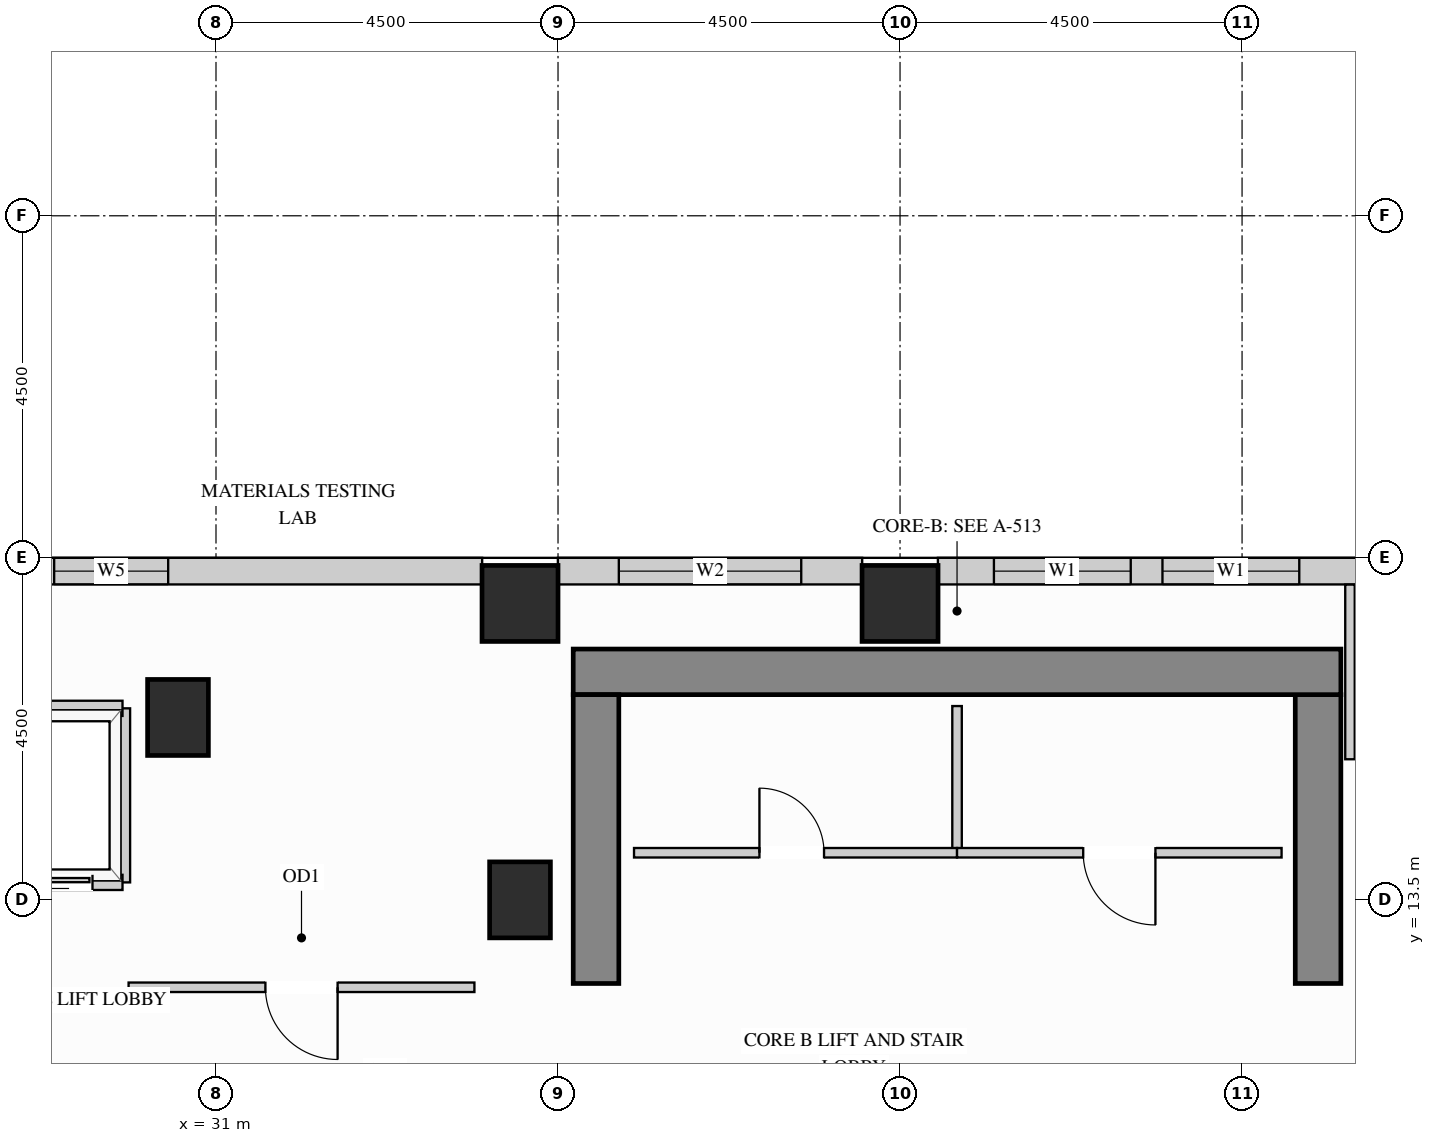
"""IFC4 building model, lengths in metres.
Left out: names, types, materials, properties, quantities, classifications, styles, units other than length and angle.
Written with IfcOpenShell. Run it as: python <this file> out.ifc"""

import sys

from ifc_helpers import new_model, si_unit, direction, frame, frame_2d, origin, origin_2d, place, context, subcontext, project, spatial, rectangle, extrude, source, transform, mapped, element, fill, save


model = new_model("IFC4")
c1 = context("Model", 3, precision=1e-05, world=origin(), true_north=direction((0.0, 1.0)))
c2 = subcontext(c1, "Body", "Model", "MODEL_VIEW")
j1 = project(units=[si_unit("LENGTHUNIT", "METRE"), si_unit("PLANEANGLEUNIT", "RADIAN")], contexts=[c1])
p1 = place(None, origin())
s1 = spatial("IfcSite", under=j1, at=p1, CompositionType="ELEMENT")
p2 = place(p1, origin())
s2 = spatial("IfcBuilding", under=s1, at=p2, CompositionType="ELEMENT")
p3 = place(p2, frame((0.0, 0.0, 161.1)))
s3 = spatial("IfcBuildingStorey", under=s2, at=p3, CompositionType="ELEMENT", Elevation=161.1)
m1 = source(origin(), c2, "Body", "SweptSolid", [
    extrude(rectangle(XDim=0.8, YDim=1.0, at=origin_2d()), origin(), (0.0, 0.0, 1.0), 3.4),
])
for number, where, z_axis, x_axis in (
    (1, (35.0, 13.5, 0.0), (0.0, 0.0, 1.0), (1.0, 0.0, 0.0)),
    (2, (30.5, 15.9, 0.0), (0.0, 0.0, 1.0), (1.0, 0.0, 0.0)),
):
    element("IfcColumn", number, at=place(p3, frame(where, z_axis=z_axis, x_axis=x_axis)), inside=s3, PredefinedType="COLUMN", context=c2, shape_type="MappedRepresentation", body=[
        mapped(m1, transform((0.0, 0.0, 0.0), x_axis=(1.0, 0.0, 0.0), y_axis=(0.0, 1.0, 0.0), z_axis=(0.0, 0.0, 1.0))),
    ])
m2 = source(origin(), c2, "Body", "SweptSolid", [
    extrude(rectangle(XDim=1.0, YDim=1.0, at=origin_2d()), origin(), (0.0, 0.0, 1.0), 3.4),
])
for number, where, z_axis, x_axis in (
    (3, (35.0, 17.4, 0.0), (0.0, 0.0, 1.0), (1.0, 0.0, 0.0)),
    (4, (40.0, 17.4, 0.0), (0.0, 0.0, 1.0), (1.0, 0.0, 0.0)),
):
    element("IfcColumn", number, at=place(p3, frame(where, z_axis=z_axis, x_axis=x_axis)), inside=s3, PredefinedType="COLUMN", context=c2, shape_type="MappedRepresentation", body=[
        mapped(m2, transform((0.0, 0.0, 0.0), x_axis=(1.0, 0.0, 0.0), y_axis=(0.0, 1.0, 0.0), z_axis=(0.0, 0.0, 1.0))),
    ])
m3 = source(origin(), c2, "Body", "SweptSolid", [
    extrude(rectangle(XDim=3.8, YDim=0.6, at=frame_2d((1.9, 0.0))), origin(), (0.0, 0.0, 1.0), 3.4),
])
p4 = place(p3, frame((45.5, 12.4, 0.0), z_axis=(0.0, 0.0, 1.0), x_axis=(0.0, 1.0, 0.0)))
e5 = element("IfcWall", 5, at=p4, inside=s3, PredefinedType="SHEAR", context=c2, shape_type="MappedRepresentation", body=[
    mapped(m3, transform((0.0, 0.0, 0.0), x_axis=(1.0, 0.0, 0.0), y_axis=(0.0, 1.0, 0.0), z_axis=(0.0, 0.0, 1.0))),
])
m4 = source(origin(), c2, "Body", "SweptSolid", [
    extrude(rectangle(XDim=10.1, YDim=0.6, at=frame_2d((5.05, 0.0))), origin(), (0.0, 0.0, 1.0), 3.4),
])
p5 = place(p3, frame((35.7, 16.5, 0.0), z_axis=(0.0, 0.0, 1.0), x_axis=(1.0, 0.0, 0.0)))
e6 = element("IfcWall", 6, at=p5, inside=s3, PredefinedType="SHEAR", context=c2, shape_type="MappedRepresentation", body=[
    mapped(m4, transform((0.0, 0.0, 0.0), x_axis=(1.0, 0.0, 0.0), y_axis=(0.0, 1.0, 0.0), z_axis=(0.0, 0.0, 1.0))),
])
p6 = place(p3, frame((36.0, 12.4, 0.0), z_axis=(0.0, 0.0, 1.0), x_axis=(0.0, 1.0, 0.0)))
e7 = element("IfcWall", 7, at=p6, inside=s3, PredefinedType="SHEAR", context=c2, shape_type="MappedRepresentation", body=[
    mapped(m3, transform((0.0, 0.0, 0.0), x_axis=(1.0, 0.0, 0.0), y_axis=(0.0, 1.0, 0.0), z_axis=(0.0, 0.0, 1.0))),
])
p7 = place(p3, frame((47.102, 17.825, 0.0), z_axis=(0.0, 0.0, 1.0), x_axis=(-1.0, 0.0, 0.0)))
e8 = element("IfcWall", 8, at=p7, inside=s3, PredefinedType="SOLIDWALL", context=c2, shape_type="SweptSolid", body=[
    extrude(rectangle(XDim=6.604, YDim=0.35, at=frame_2d((3.302, 0.0))), origin(), (0.0, 0.0, 1.0), 2.612),
])
p8 = place(p7, frame((1.849, 0.0, 0.78)))
e9 = element("IfcOpeningElement", 9, at=p8, cuts=e8, PredefinedType="OPENING", context=c2, shape_type="SweptSolid", body=[
    extrude(rectangle(XDim=1.8, YDim=1.652, at=frame_2d((0.9, 0.826))), frame((0.0, 0.185, 0.0), z_axis=(0.0, -1.0, 0.0), x_axis=(1.0, 0.0, 0.0)), (0.0, 0.0, 1.0), 0.37),
])
p9 = place(p7, frame((4.067, 0.0, 0.78)))
e10 = element("IfcOpeningElement", 10, at=p9, cuts=e8, PredefinedType="OPENING", context=c2, shape_type="SweptSolid", body=[
    extrude(rectangle(XDim=1.8, YDim=1.652, at=frame_2d((0.9, 0.826))), frame((0.0, 0.185, 0.0), z_axis=(0.0, -1.0, 0.0), x_axis=(1.0, 0.0, 0.0)), (0.0, 0.0, 1.0), 0.37),
])
p10 = place(p3, frame((39.502, 17.825, 0.0), z_axis=(0.0, 0.0, 1.0), x_axis=(-1.0, 0.0, 0.0)))
e11 = element("IfcWall", 11, at=p10, inside=s3, PredefinedType="SOLIDWALL", context=c2, shape_type="SweptSolid", body=[
    extrude(rectangle(XDim=4.004, YDim=0.35, at=frame_2d((2.002, 0.0))), origin(), (0.0, 0.0, 1.0), 2.612),
])
p11 = place(p10, frame((0.802, 0.0, 0.78)))
e12 = element("IfcOpeningElement", 12, at=p11, cuts=e11, PredefinedType="OPENING", context=c2, shape_type="SweptSolid", body=[
    extrude(rectangle(XDim=2.4, YDim=1.652, at=frame_2d((1.2, 0.826))), frame((0.0, 0.185, 0.0), z_axis=(0.0, -1.0, 0.0), x_axis=(1.0, 0.0, 0.0)), (0.0, 0.0, 1.0), 0.37),
])
p12 = place(p3, frame((34.502, 17.825, 0.0), z_axis=(0.0, 0.0, 1.0), x_axis=(-1.0, 0.0, 0.0)))
e13 = element("IfcWall", 13, at=p12, inside=s3, PredefinedType="SOLIDWALL", context=c2, shape_type="SweptSolid", body=[
    extrude(rectangle(XDim=15.104, YDim=0.35, at=frame_2d((7.552, 0.0))), origin(), (0.0, 0.0, 1.0), 3.385),
])
p13 = place(p12, frame((4.131, 0.0, 0.78)))
e14 = element("IfcOpeningElement", 14, at=p13, cuts=e13, PredefinedType="OPENING", context=c2, shape_type="SweptSolid", body=[
    extrude(rectangle(XDim=1.5, YDim=2.0, at=frame_2d((0.75, 1.0))), frame((0.0, 0.185, 0.0), z_axis=(0.0, -1.0, 0.0), x_axis=(1.0, 0.0, 0.0)), (0.0, 0.0, 1.0), 0.37),
])
p14 = place(p12, frame((9.442, 0.0, 0.78)))
e15 = element("IfcOpeningElement", 15, at=p14, cuts=e13, PredefinedType="OPENING", context=c2, shape_type="SweptSolid", body=[
    extrude(rectangle(XDim=1.5, YDim=2.0, at=frame_2d((0.75, 1.0))), frame((0.0, 0.185, 0.0), z_axis=(0.0, -1.0, 0.0), x_axis=(1.0, 0.0, 0.0)), (0.0, 0.0, 1.0), 0.37),
])
m5 = source(origin(), c2, "Body", "SweptSolid", [
    extrude(rectangle(XDim=1.93, YDim=0.125, at=frame_2d((0.965, 0.0))), origin(), (0.0, 0.0, 1.0), 3.385),
])
p15 = place(p3, frame((40.75, 14.12, 0.0), z_axis=(0.0, 0.0, 1.0), x_axis=(0.0, 1.0, 0.0)))
e16 = element("IfcWall", 16, at=p15, inside=s3, PredefinedType="PARTITIONING", context=c2, shape_type="MappedRepresentation", body=[
    mapped(m5, transform((0.0, 0.0, 0.0), x_axis=(1.0, 0.0, 0.0), y_axis=(0.0, 1.0, 0.0), z_axis=(0.0, 0.0, 1.0))),
])
p16 = place(p3, frame((36.5, 14.12, 0.0), z_axis=(0.0, 0.0, 1.0), x_axis=(1.0, 0.0, 0.0)))
e17 = element("IfcWall", 17, at=p16, inside=s3, PredefinedType="PARTITIONING", context=c2, shape_type="SweptSolid", body=[
    extrude(rectangle(XDim=4.25, YDim=0.125, at=frame_2d((2.125, 0.0))), origin(), (0.0, 0.0, 1.0), 3.385),
])
p17 = place(p16, frame((1.65, 0.0, 0.0)))
e18 = element("IfcOpeningElement", 18, at=p17, cuts=e17, PredefinedType="OPENING", context=c2, shape_type="SweptSolid", body=[
    extrude(rectangle(XDim=0.85, YDim=2.1, at=frame_2d((0.425, 1.05))), frame((0.0, 0.073, 0.0), z_axis=(0.0, -1.0, 0.0), x_axis=(1.0, 0.0, 0.0)), (0.0, 0.0, 1.0), 0.145),
])
p18 = place(p3, frame((40.75, 14.12, 0.0), z_axis=(0.0, 0.0, 1.0), x_axis=(1.0, 0.0, 0.0)))
e19 = element("IfcWall", 19, at=p18, inside=s3, PredefinedType="PARTITIONING", context=c2, shape_type="SweptSolid", body=[
    extrude(rectangle(XDim=4.27, YDim=0.125, at=frame_2d((2.135, 0.0))), origin(), (0.0, 0.0, 1.0), 3.385),
])
p19 = place(p18, frame((1.66, 0.0, 0.0)))
e20 = element("IfcOpeningElement", 20, at=p19, cuts=e19, PredefinedType="OPENING", context=c2, shape_type="SweptSolid", body=[
    extrude(rectangle(XDim=0.95, YDim=2.15, at=frame_2d((0.475, 1.075))), frame((0.0, 0.073, 0.0), z_axis=(0.0, -1.0, 0.0), x_axis=(1.0, 0.0, 0.0)), (0.0, 0.0, 1.0), 0.145),
])
m6 = source(origin(), c2, "Body", "SweptSolid", [
    extrude(rectangle(XDim=2.298, YDim=0.125, at=frame_2d((1.149, 0.0))), origin(), (0.0, 0.0, 1.0), 3.385),
])
p20 = place(p3, frame((45.92, 15.35, 0.0), z_axis=(0.0, 0.0, 1.0), x_axis=(0.0, 1.0, 0.0)))
e21 = element("IfcWall", 21, at=p20, inside=s3, PredefinedType="PARTITIONING", context=c2, shape_type="MappedRepresentation", body=[
    mapped(m6, transform((0.0, 0.0, 0.0), x_axis=(1.0, 0.0, 0.0), y_axis=(0.0, 1.0, 0.0), z_axis=(0.0, 0.0, 1.0))),
])
p21 = place(p3, frame((29.85, 12.35, 0.0), z_axis=(0.0, 0.0, 1.0), x_axis=(1.0, 0.0, 0.0)))
e22 = element("IfcWall", 22, at=p21, inside=s3, PredefinedType="PARTITIONING", context=c2, shape_type="SweptSolid", body=[
    extrude(rectangle(XDim=4.55, YDim=0.125, at=frame_2d((2.275, 0.0))), origin(), (0.0, 0.0, 1.0), 3.385),
])
p22 = place(p21, frame((1.8, 0.0, 0.0)))
e23 = element("IfcOpeningElement", 23, at=p22, cuts=e22, PredefinedType="OPENING", context=c2, shape_type="SweptSolid", body=[
    extrude(rectangle(XDim=0.95, YDim=2.15, at=frame_2d((0.475, 1.075))), frame((0.0, 0.073, 0.0), z_axis=(0.0, -1.0, 0.0), x_axis=(1.0, 0.0, 0.0)), (0.0, 0.0, 1.0), 0.145),
])
m7 = source(origin(), c2, "Body", "SweptSolid", [
    extrude(rectangle(XDim=2.29, YDim=0.2, at=frame_2d((1.145, 0.0))), origin(), (0.0, 0.0, 1.0), 3.385),
])
p23 = place(p3, frame((29.77, 13.73, 0.0), z_axis=(0.0, 0.0, 1.0), x_axis=(0.0, 1.0, 0.0)))
e24 = element("IfcWall", 24, at=p23, inside=s3, PredefinedType="PARTITIONING", context=c2, shape_type="MappedRepresentation", body=[
    mapped(m7, transform((0.0, 0.0, 0.0), x_axis=(1.0, 0.0, 0.0), y_axis=(0.0, 1.0, 0.0), z_axis=(0.0, 0.0, 1.0))),
])
m8 = source(origin(), c2, "Body", "SweptSolid", [
    extrude(rectangle(XDim=1.89, YDim=0.2, at=frame_2d((0.945, 0.0))), origin(), (0.0, 0.0, 1.0), 2.773),
])
p24 = place(p3, frame((27.88, 16.02, 0.0), z_axis=(0.0, 0.0, 1.0), x_axis=(1.0, 0.0, 0.0)))
e25 = element("IfcWall", 25, at=p24, inside=s3, PredefinedType="PARTITIONING", context=c2, shape_type="MappedRepresentation", body=[
    mapped(m8, transform((0.0, 0.0, 0.0), x_axis=(1.0, 0.0, 0.0), y_axis=(0.0, 1.0, 0.0), z_axis=(0.0, 0.0, 1.0))),
])
p25 = place(p3, frame((27.88, 13.73, 0.0), z_axis=(0.0, 0.0, 1.0), x_axis=(1.0, 0.0, 0.0)))
e26 = element("IfcWall", 26, at=p25, inside=s3, PredefinedType="PARTITIONING", context=c2, shape_type="SweptSolid", body=[
    extrude(rectangle(XDim=1.89, YDim=0.2, at=frame_2d((0.945, 0.0))), origin(), (0.0, 0.0, 1.0), 2.466),
])
p26 = place(p25, frame((0.395, 0.0, 0.0)))
e27 = element("IfcOpeningElement", 27, at=p26, cuts=e26, PredefinedType="OPENING", context=c2, shape_type="SweptSolid", body=[
    extrude(rectangle(XDim=1.1, YDim=2.2, at=frame_2d((0.55, 1.1))), frame((0.0, 0.11, 0.0), z_axis=(0.0, -1.0, 0.0), x_axis=(1.0, 0.0, 0.0)), (0.0, 0.0, 1.0), 0.22),
])
m9 = source(origin(), c2, "Body", "SweptSolid", [
    extrude(rectangle(XDim=1.1, YDim=2.2, at=frame_2d((0.55, 1.1))), frame((0.0, 0.025, 0.0), z_axis=(0.0, -1.0, 0.0), x_axis=(1.0, 0.0, 0.0)), (0.0, 0.0, 1.0), 0.05),
])
p27 = place(p26, origin())
e28 = element("IfcDoor", 28, at=p27, inside=s3, OperationType="SLIDING_TO_LEFT", PredefinedType="DOOR", context=c2, shape_type="MappedRepresentation", body=[
    mapped(m9, transform((0.0, 0.0, 0.0), x_axis=(1.0, 0.0, 0.0), y_axis=(0.0, 1.0, 0.0), z_axis=(0.0, 0.0, 1.0))),
])
fill(e27, e28)
m10 = source(origin(), c2, "Body", "SweptSolid", [
    extrude(rectangle(XDim=0.95, YDim=2.15, at=frame_2d((0.475, 1.075))), frame((0.0, 0.025, 0.0), z_axis=(0.0, -1.0, 0.0), x_axis=(1.0, 0.0, 0.0)), (0.0, 0.0, 1.0), 0.05),
])
p28 = place(p19, origin())
e29 = element("IfcDoor", 29, at=p28, inside=s3, OperationType="SINGLE_SWING_RIGHT", PredefinedType="DOOR", context=c2, shape_type="MappedRepresentation", body=[
    mapped(m10, transform((0.0, 0.0, 0.0), x_axis=(1.0, 0.0, 0.0), y_axis=(0.0, 1.0, 0.0), z_axis=(0.0, 0.0, 1.0))),
])
fill(e20, e29)
p29 = place(p22, origin())
e30 = element("IfcDoor", 30, at=p29, inside=s3, OperationType="SINGLE_SWING_RIGHT", PredefinedType="DOOR", context=c2, shape_type="MappedRepresentation", body=[
    mapped(m10, transform((0.0, 0.0, 0.0), x_axis=(1.0, 0.0, 0.0), y_axis=(0.0, 1.0, 0.0), z_axis=(0.0, 0.0, 1.0))),
])
fill(e23, e30)
m11 = source(origin(), c2, "Body", "SweptSolid", [
    extrude(rectangle(XDim=0.85, YDim=2.1, at=frame_2d((0.425, 1.05))), frame((0.0, 0.025, 0.0), z_axis=(0.0, -1.0, 0.0), x_axis=(1.0, 0.0, 0.0)), (0.0, 0.0, 1.0), 0.05),
])
p30 = place(p17, origin())
e31 = element("IfcDoor", 31, at=p30, inside=s3, OperationType="SINGLE_SWING_LEFT", PredefinedType="DOOR", context=c2, shape_type="MappedRepresentation", body=[
    mapped(m11, transform((0.0, 0.0, 0.0), x_axis=(1.0, 0.0, 0.0), y_axis=(0.0, 1.0, 0.0), z_axis=(0.0, 0.0, 1.0))),
])
fill(e18, e31)
m12 = source(origin(), c2, "Body", "SweptSolid", [
    extrude(rectangle(XDim=1.8, YDim=1.652, at=frame_2d((0.9, 0.826))), frame((0.0, 0.03, 0.0), z_axis=(0.0, -1.0, 0.0), x_axis=(1.0, 0.0, 0.0)), (0.0, 0.0, 1.0), 0.06),
])
p31 = place(p8, origin())
e32 = element("IfcWindow", 32, at=p31, inside=s3, PartitioningType="SINGLE_PANEL", PredefinedType="WINDOW", context=c2, shape_type="MappedRepresentation", body=[
    mapped(m12, transform((0.0, 0.0, 0.0), x_axis=(1.0, 0.0, 0.0), y_axis=(0.0, 1.0, 0.0), z_axis=(0.0, 0.0, 1.0))),
])
fill(e9, e32)
p32 = place(p9, origin())
e33 = element("IfcWindow", 33, at=p32, inside=s3, PartitioningType="SINGLE_PANEL", PredefinedType="WINDOW", context=c2, shape_type="MappedRepresentation", body=[
    mapped(m12, transform((0.0, 0.0, 0.0), x_axis=(1.0, 0.0, 0.0), y_axis=(0.0, 1.0, 0.0), z_axis=(0.0, 0.0, 1.0))),
])
fill(e10, e33)
m13 = source(origin(), c2, "Body", "SweptSolid", [
    extrude(rectangle(XDim=2.4, YDim=1.652, at=frame_2d((1.2, 0.826))), frame((0.0, 0.03, 0.0), z_axis=(0.0, -1.0, 0.0), x_axis=(1.0, 0.0, 0.0)), (0.0, 0.0, 1.0), 0.06),
])
p33 = place(p11, origin())
e34 = element("IfcWindow", 34, at=p33, inside=s3, PartitioningType="SINGLE_PANEL", PredefinedType="WINDOW", context=c2, shape_type="MappedRepresentation", body=[
    mapped(m13, transform((0.0, 0.0, 0.0), x_axis=(1.0, 0.0, 0.0), y_axis=(0.0, 1.0, 0.0), z_axis=(0.0, 0.0, 1.0))),
])
fill(e12, e34)
m14 = source(origin(), c2, "Body", "SweptSolid", [
    extrude(rectangle(XDim=1.5, YDim=2.0, at=frame_2d((0.75, 1.0))), frame((0.0, 0.03, 0.0), z_axis=(0.0, -1.0, 0.0), x_axis=(1.0, 0.0, 0.0)), (0.0, 0.0, 1.0), 0.06),
])
p34 = place(p13, origin())
e35 = element("IfcWindow", 35, at=p34, inside=s3, PartitioningType="SINGLE_PANEL", PredefinedType="WINDOW", context=c2, shape_type="MappedRepresentation", body=[
    mapped(m14, transform((0.0, 0.0, 0.0), x_axis=(1.0, 0.0, 0.0), y_axis=(0.0, 1.0, 0.0), z_axis=(0.0, 0.0, 1.0))),
])
fill(e14, e35)
save(model, sys.argv[1])
